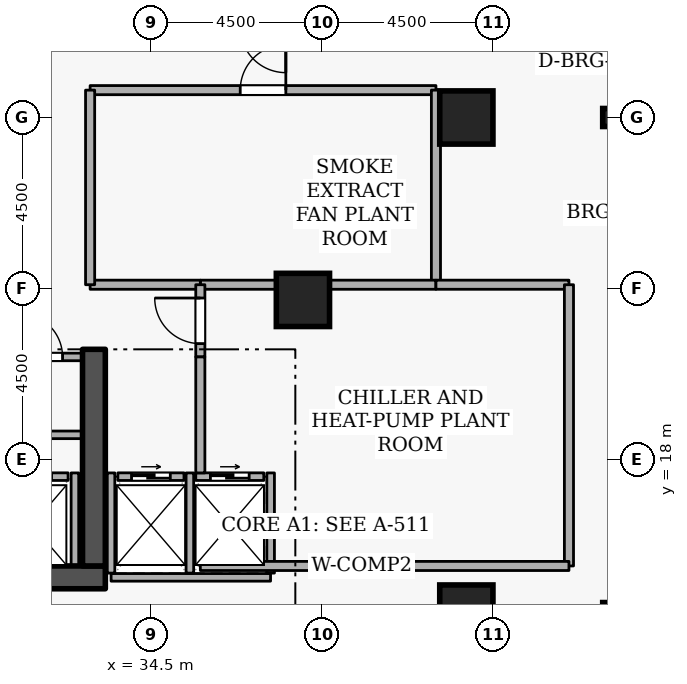
"""IFC4 building model, lengths in metres.
Left out: names, types, materials, properties, quantities, classifications, styles, units other than length and angle.
Written with IfcOpenShell. Run it as: python <this file> out.ifc"""

import sys

from ifc_helpers import new_model, si_unit, direction, frame, frame_2d, origin, origin_2d, place, context, subcontext, project, spatial, rectangle, i_section, extrude, element, fill, save


model = new_model("IFC4")
c1 = context("Model", 3, precision=1e-05, world=origin(), true_north=direction((0.0, 1.0)))
c2 = subcontext(c1, "Body", "Model", "MODEL_VIEW")
j1 = project(units=[si_unit("LENGTHUNIT", "METRE"), si_unit("PLANEANGLEUNIT", "RADIAN")], contexts=[c1])
p1 = place(None, origin())
s1 = spatial("IfcSite", under=j1, at=p1, CompositionType="ELEMENT")
p2 = place(p1, origin())
s2 = spatial("IfcBuilding", under=s1, at=p2, CompositionType="ELEMENT")
p3 = place(p2, frame((0.0, 0.0, 71.7)))
s3 = spatial("IfcBuildingStorey", under=s2, at=p3, CompositionType="ELEMENT", Elevation=71.7)
p4 = place(p3, frame((17.7, 14.9, 0.0), z_axis=(0.0, 0.0, 1.0), x_axis=(1.0, 0.0, 0.0)))
e1 = element("IfcWall", 1, at=p4, inside=s3, PredefinedType="SHEAR", context=c2, shape_type="SweptSolid", body=[
    extrude(rectangle(XDim=15.6, YDim=0.6, at=frame_2d((7.8, 0.0))), origin(), (0.0, 0.0, 1.0), 4.2),
])
p5 = place(p3, frame((33.0, 15.2, 0.0), z_axis=(0.0, 0.0, 1.0), x_axis=(0.0, 1.0, 0.0)))
e2 = element("IfcWall", 2, at=p5, inside=s3, PredefinedType="SHEAR", context=c2, shape_type="SweptSolid", body=[
    extrude(rectangle(XDim=5.7, YDim=0.6, at=frame_2d((2.85, 0.0))), origin(), (0.0, 0.0, 1.0), 4.2),
])
for number, where, z_axis, x_axis in (
    (3, (42.8, 14.0, 0.0), (0.0, 0.0, 1.0), (1.0, 0.0, 0.0)),
    (4, (42.8, 27.0, 0.0), (0.0, 0.0, 1.0), (1.0, 0.0, 0.0)),
    (5, (38.5, 22.2, 0.0), (0.0, 0.0, 1.0), (1.0, 0.0, 0.0)),
):
    element("IfcColumn", number, at=place(p3, frame(where, z_axis=z_axis, x_axis=x_axis)), inside=s3, PredefinedType="COLUMN", context=c2, shape_type="SweptSolid", body=[
        extrude(rectangle(XDim=1.4, YDim=1.4, at=origin_2d()), origin(), (0.0, 0.0, 1.0), 4.2),
    ])
for number, where, z_axis, x_axis in (
    (6, (46.6, 14.0, 0.0), (0.0, 0.0, 1.0), (1.0, 0.0, 0.0)),
    (7, (46.6, 27.0, 0.0), (0.0, 0.0, 1.0), (1.0, 0.0, 0.0)),
):
    element("IfcColumn", number, at=place(p3, frame(where, z_axis=z_axis, x_axis=x_axis)), inside=s3, PredefinedType="COLUMN", context=c2, shape_type="SweptSolid", body=[
        extrude(i_section(OverallWidth=0.424, OverallDepth=0.475, WebThickness=0.048, FlangeThickness=0.077, FilletRadius=0.015, at=origin_2d()), origin(), (0.0, 0.0, 1.0), 4.2),
    ])
p6 = place(p3, frame((30.43, 17.55, 0.0), z_axis=(0.0, 0.0, 1.0), x_axis=(1.0, 0.0, 0.0)))
e8 = element("IfcWall", 8, at=p6, inside=s3, PredefinedType="STANDARD", context=c2, shape_type="SweptSolid", body=[
    extrude(rectangle(XDim=1.89, YDim=0.2, at=frame_2d((0.945, 0.0))), origin(), (0.0, 0.0, 1.0), 3.86),
])
p7 = place(p6, frame((0.435, 0.0, 0.0)))
e9 = element("IfcOpeningElement", 9, at=p7, cuts=e8, PredefinedType="OPENING", context=c2, shape_type="SweptSolid", body=[
    extrude(rectangle(XDim=1.02, YDim=2.06, at=frame_2d((0.51, 1.03))), frame((0.0, 0.11, 0.0), z_axis=(0.0, -1.0, 0.0), x_axis=(1.0, 0.0, 0.0)), (0.0, 0.0, 1.0), 0.22),
])
p8 = place(p3, frame((33.63, 17.55, 0.0), z_axis=(0.0, 0.0, 1.0), x_axis=(1.0, 0.0, 0.0)))
e10 = element("IfcWall", 10, at=p8, inside=s3, PredefinedType="STANDARD", context=c2, shape_type="SweptSolid", body=[
    extrude(rectangle(XDim=1.74, YDim=0.2, at=frame_2d((0.87, 0.0))), origin(), (0.0, 0.0, 1.0), 3.86),
])
p9 = place(p8, frame((0.36, 0.0, 0.0)))
e11 = element("IfcOpeningElement", 11, at=p9, cuts=e10, PredefinedType="OPENING", context=c2, shape_type="SweptSolid", body=[
    extrude(rectangle(XDim=1.02, YDim=2.06, at=frame_2d((0.51, 1.03))), frame((0.0, 0.11, 0.0), z_axis=(0.0, -1.0, 0.0), x_axis=(1.0, 0.0, 0.0)), (0.0, 0.0, 1.0), 0.22),
])
p10 = place(p3, frame((35.68, 17.55, 0.0), z_axis=(0.0, 0.0, 1.0), x_axis=(1.0, 0.0, 0.0)))
e12 = element("IfcWall", 12, at=p10, inside=s3, PredefinedType="STANDARD", context=c2, shape_type="SweptSolid", body=[
    extrude(rectangle(XDim=1.79, YDim=0.2, at=frame_2d((0.895, 0.0))), origin(), (0.0, 0.0, 1.0), 3.86),
])
p11 = place(p10, frame((0.385, 0.0, 0.0)))
e13 = element("IfcOpeningElement", 13, at=p11, cuts=e12, PredefinedType="OPENING", context=c2, shape_type="SweptSolid", body=[
    extrude(rectangle(XDim=1.02, YDim=2.06, at=frame_2d((0.51, 1.03))), frame((0.0, 0.11, 0.0), z_axis=(0.0, -1.0, 0.0), x_axis=(1.0, 0.0, 0.0)), (0.0, 0.0, 1.0), 0.22),
])
p12 = place(p3, frame((32.5, 15.212, 0.0), z_axis=(0.0, 0.0, 1.0), x_axis=(0.0, 1.0, 0.0)))
e14 = element("IfcWall", 14, at=p12, inside=s3, PredefinedType="STANDARD", context=c2, shape_type="SweptSolid", body=[
    extrude(rectangle(XDim=2.436, YDim=0.2, at=frame_2d((1.218, 0.0))), origin(), (0.0, 0.0, 1.0), 3.86),
])
p13 = place(p3, frame((33.452, 14.9, 0.0), z_axis=(0.0, 0.0, 1.0), x_axis=(1.0, 0.0, 0.0)))
e15 = element("IfcWall", 15, at=p13, inside=s3, PredefinedType="STANDARD", context=c2, shape_type="SweptSolid", body=[
    extrude(rectangle(XDim=4.196, YDim=0.2, at=frame_2d((2.098, 0.0))), origin(), (0.0, 0.0, 1.0), 3.86),
])
for number, where, z_axis, x_axis in (
    (16, (35.525, 15.012, 0.0), (0.0, 0.0, 1.0), (0.0, 1.0, 0.0)),
    (17, (33.45, 15.012, 0.0), (0.0, 0.0, 1.0), (0.0, 1.0, 0.0)),
    (18, (37.65, 15.012, 0.0), (0.0, 0.0, 1.0), (0.0, 1.0, 0.0)),
):
    element("IfcWall", number, at=place(p3, frame(where, z_axis=z_axis, x_axis=x_axis)), inside=s3, PredefinedType="STANDARD", context=c2, shape_type="SweptSolid", body=[
        extrude(rectangle(XDim=2.636, YDim=0.2, at=frame_2d((1.318, 0.0))), origin(), (0.0, 0.0, 1.0), 3.86),
    ])
p14 = place(p3, frame((32.7, 18.65, 0.0), z_axis=(0.0, 0.0, 1.0), x_axis=(-1.0, 0.0, 0.0)))
e19 = element("IfcWall", 19, at=p14, inside=s3, PredefinedType="STANDARD", context=c2, shape_type="SweptSolid", body=[
    extrude(rectangle(XDim=2.2, YDim=0.2, at=frame_2d((1.1, 0.0))), origin(), (0.0, 0.0, 1.0), 3.86),
])
p15 = place(p3, frame((30.5, 20.7, 0.0), z_axis=(0.0, 0.0, 1.0), x_axis=(1.0, 0.0, 0.0)))
e20 = element("IfcWall", 20, at=p15, inside=s3, PredefinedType="STANDARD", context=c2, shape_type="SweptSolid", body=[
    extrude(rectangle(XDim=2.2, YDim=0.2, at=frame_2d((1.1, 0.0))), origin(), (0.0, 0.0, 1.0), 3.86),
])
p16 = place(p15, frame((0.525, 0.0, 0.0)))
e21 = element("IfcOpeningElement", 21, at=p16, cuts=e20, PredefinedType="OPENING", context=c2, shape_type="SweptSolid", body=[
    extrude(rectangle(XDim=1.15, YDim=2.1, at=frame_2d((0.575, 1.05))), frame((0.0, 0.11, 0.0), z_axis=(0.0, -1.0, 0.0), x_axis=(1.0, 0.0, 0.0)), (0.0, 0.0, 1.0), 0.22),
])
p17 = place(p3, frame((32.9, 27.72, 0.0), z_axis=(0.0, 0.0, 1.0), x_axis=(1.0, 0.0, 0.0)))
e22 = element("IfcWall", 22, at=p17, inside=s3, PredefinedType="STANDARD", context=c2, shape_type="SweptSolid", body=[
    extrude(rectangle(XDim=9.1, YDim=0.24, at=frame_2d((4.55, 0.0))), origin(), (0.0, 0.0, 1.0), 3.86),
])
p18 = place(p17, frame((3.95, 0.0, 0.0)))
e23 = element("IfcOpeningElement", 23, at=p18, cuts=e22, PredefinedType="OPENING", context=c2, shape_type="SweptSolid", body=[
    extrude(rectangle(XDim=1.2, YDim=2.1, at=frame_2d((0.6, 1.05))), frame((0.0, 0.13, 0.0), z_axis=(0.0, -1.0, 0.0), x_axis=(1.0, 0.0, 0.0)), (0.0, 0.0, 1.0), 0.26),
])
p19 = place(p3, frame((42.0, 27.72, 0.0), z_axis=(0.0, 0.0, 1.0), x_axis=(0.0, -1.0, 0.0)))
e24 = element("IfcWall", 24, at=p19, inside=s3, PredefinedType="STANDARD", context=c2, shape_type="SweptSolid", body=[
    extrude(rectangle(XDim=5.12, YDim=0.24, at=frame_2d((2.56, 0.0))), origin(), (0.0, 0.0, 1.0), 3.86),
])
p20 = place(p3, frame((42.0, 22.6, 0.0), z_axis=(0.0, 0.0, 1.0), x_axis=(-1.0, 0.0, 0.0)))
e25 = element("IfcWall", 25, at=p20, inside=s3, PredefinedType="STANDARD", context=c2, shape_type="SweptSolid", body=[
    extrude(rectangle(XDim=6.2, YDim=0.24, at=frame_2d((3.1, 0.0))), origin(), (0.0, 0.0, 1.0), 3.86),
])
p21 = place(p3, frame((35.8, 22.6, 0.0), z_axis=(0.0, 0.0, 1.0), x_axis=(-1.0, 0.0, 0.0)))
e26 = element("IfcWall", 26, at=p21, inside=s3, PredefinedType="STANDARD", context=c2, shape_type="SweptSolid", body=[
    extrude(rectangle(XDim=2.9, YDim=0.24, at=frame_2d((1.45, 0.0))), origin(), (0.0, 0.0, 1.0), 3.86),
])
p22 = place(p3, frame((32.9, 22.6, 0.0), z_axis=(0.0, 0.0, 1.0), x_axis=(0.0, 1.0, 0.0)))
e27 = element("IfcWall", 27, at=p22, inside=s3, PredefinedType="STANDARD", context=c2, shape_type="SweptSolid", body=[
    extrude(rectangle(XDim=5.12, YDim=0.24, at=frame_2d((2.56, 0.0))), origin(), (0.0, 0.0, 1.0), 3.065),
])
p23 = place(p3, frame((35.8, 20.7, 0.0), z_axis=(0.0, 0.0, 1.0), x_axis=(0.0, 1.0, 0.0)))
e28 = element("IfcWall", 28, at=p23, inside=s3, PredefinedType="STANDARD", context=c2, shape_type="SweptSolid", body=[
    extrude(rectangle(XDim=1.9, YDim=0.24, at=frame_2d((0.95, 0.0))), origin(), (0.0, 0.0, 1.0), 3.86),
])
p24 = place(p23, frame((0.35, 0.0, 0.0)))
e29 = element("IfcOpeningElement", 29, at=p24, cuts=e28, PredefinedType="OPENING", context=c2, shape_type="SweptSolid", body=[
    extrude(rectangle(XDim=1.2, YDim=2.1, at=frame_2d((0.6, 1.05))), frame((0.0, 0.13, 0.0), z_axis=(0.0, -1.0, 0.0), x_axis=(1.0, 0.0, 0.0)), (0.0, 0.0, 1.0), 0.26),
])
p25 = place(p3, frame((42.0, 22.6, 0.0), z_axis=(0.0, 0.0, 1.0), x_axis=(1.0, 0.0, 0.0)))
e30 = element("IfcWall", 30, at=p25, inside=s3, PredefinedType="STANDARD", context=c2, shape_type="SweptSolid", body=[
    extrude(rectangle(XDim=3.5, YDim=0.24, at=frame_2d((1.75, 0.0))), origin(), (0.0, 0.0, 1.0), 3.86),
])
p26 = place(p3, frame((45.5, 22.6, 0.0), z_axis=(0.0, 0.0, 1.0), x_axis=(0.0, -1.0, 0.0)))
e31 = element("IfcWall", 31, at=p26, inside=s3, PredefinedType="STANDARD", context=c2, shape_type="SweptSolid", body=[
    extrude(rectangle(XDim=7.4, YDim=0.24, at=frame_2d((3.7, 0.0))), origin(), (0.0, 0.0, 1.0), 3.86),
])
p27 = place(p3, frame((45.5, 15.2, 0.0), z_axis=(0.0, 0.0, 1.0), x_axis=(-1.0, 0.0, 0.0)))
e32 = element("IfcWall", 32, at=p27, inside=s3, PredefinedType="STANDARD", context=c2, shape_type="SweptSolid", body=[
    extrude(rectangle(XDim=9.7, YDim=0.24, at=frame_2d((4.85, 0.0))), origin(), (0.0, 0.0, 1.0), 3.86),
])
p28 = place(p3, frame((35.8, 17.648, 0.0), z_axis=(0.0, 0.0, 1.0), x_axis=(0.0, 1.0, 0.0)))
e33 = element("IfcWall", 33, at=p28, inside=s3, PredefinedType="STANDARD", context=c2, shape_type="SweptSolid", body=[
    extrude(rectangle(XDim=3.052, YDim=0.24, at=frame_2d((1.526, 0.0))), origin(), (0.0, 0.0, 1.0), 3.86),
])
p29 = place(p9, origin())
e34 = element("IfcDoor", 34, at=p29, inside=s3, OperationType="SLIDING_TO_LEFT", PredefinedType="DOOR", context=c2, shape_type="SweptSolid", body=[
    extrude(rectangle(XDim=1.02, YDim=2.06, at=frame_2d((0.51, 1.03))), frame((0.0, 0.025, 0.0), z_axis=(0.0, -1.0, 0.0), x_axis=(1.0, 0.0, 0.0)), (0.0, 0.0, 1.0), 0.05),
])
fill(e11, e34)
p30 = place(p11, origin())
e35 = element("IfcDoor", 35, at=p30, inside=s3, OperationType="SLIDING_TO_LEFT", PredefinedType="DOOR", context=c2, shape_type="SweptSolid", body=[
    extrude(rectangle(XDim=1.02, YDim=2.06, at=frame_2d((0.51, 1.03))), frame((0.0, 0.025, 0.0), z_axis=(0.0, -1.0, 0.0), x_axis=(1.0, 0.0, 0.0)), (0.0, 0.0, 1.0), 0.05),
])
fill(e13, e35)
p31 = place(p16, origin())
e36 = element("IfcDoor", 36, at=p31, inside=s3, OperationType="SINGLE_SWING_LEFT", PredefinedType="DOOR", context=c2, shape_type="SweptSolid", body=[
    extrude(rectangle(XDim=1.15, YDim=2.1, at=frame_2d((0.575, 1.05))), frame((0.0, 0.025, 0.0), z_axis=(0.0, -1.0, 0.0), x_axis=(1.0, 0.0, 0.0)), (0.0, 0.0, 1.0), 0.05),
])
fill(e21, e36)
p32 = place(p18, origin())
e37 = element("IfcDoor", 37, at=p32, inside=s3, OperationType="SINGLE_SWING_RIGHT", PredefinedType="DOOR", context=c2, shape_type="SweptSolid", body=[
    extrude(rectangle(XDim=1.2, YDim=2.1, at=frame_2d((0.6, 1.05))), frame((0.0, 0.025, 0.0), z_axis=(0.0, -1.0, 0.0), x_axis=(1.0, 0.0, 0.0)), (0.0, 0.0, 1.0), 0.05),
])
fill(e23, e37)
p33 = place(p24, origin())
e38 = element("IfcDoor", 38, at=p33, inside=s3, OperationType="SINGLE_SWING_RIGHT", PredefinedType="DOOR", context=c2, shape_type="SweptSolid", body=[
    extrude(rectangle(XDim=1.2, YDim=2.1, at=frame_2d((0.6, 1.05))), frame((0.0, 0.025, 0.0), z_axis=(0.0, -1.0, 0.0), x_axis=(1.0, 0.0, 0.0)), (0.0, 0.0, 1.0), 0.05),
])
fill(e29, e38)
save(model, sys.argv[1])
